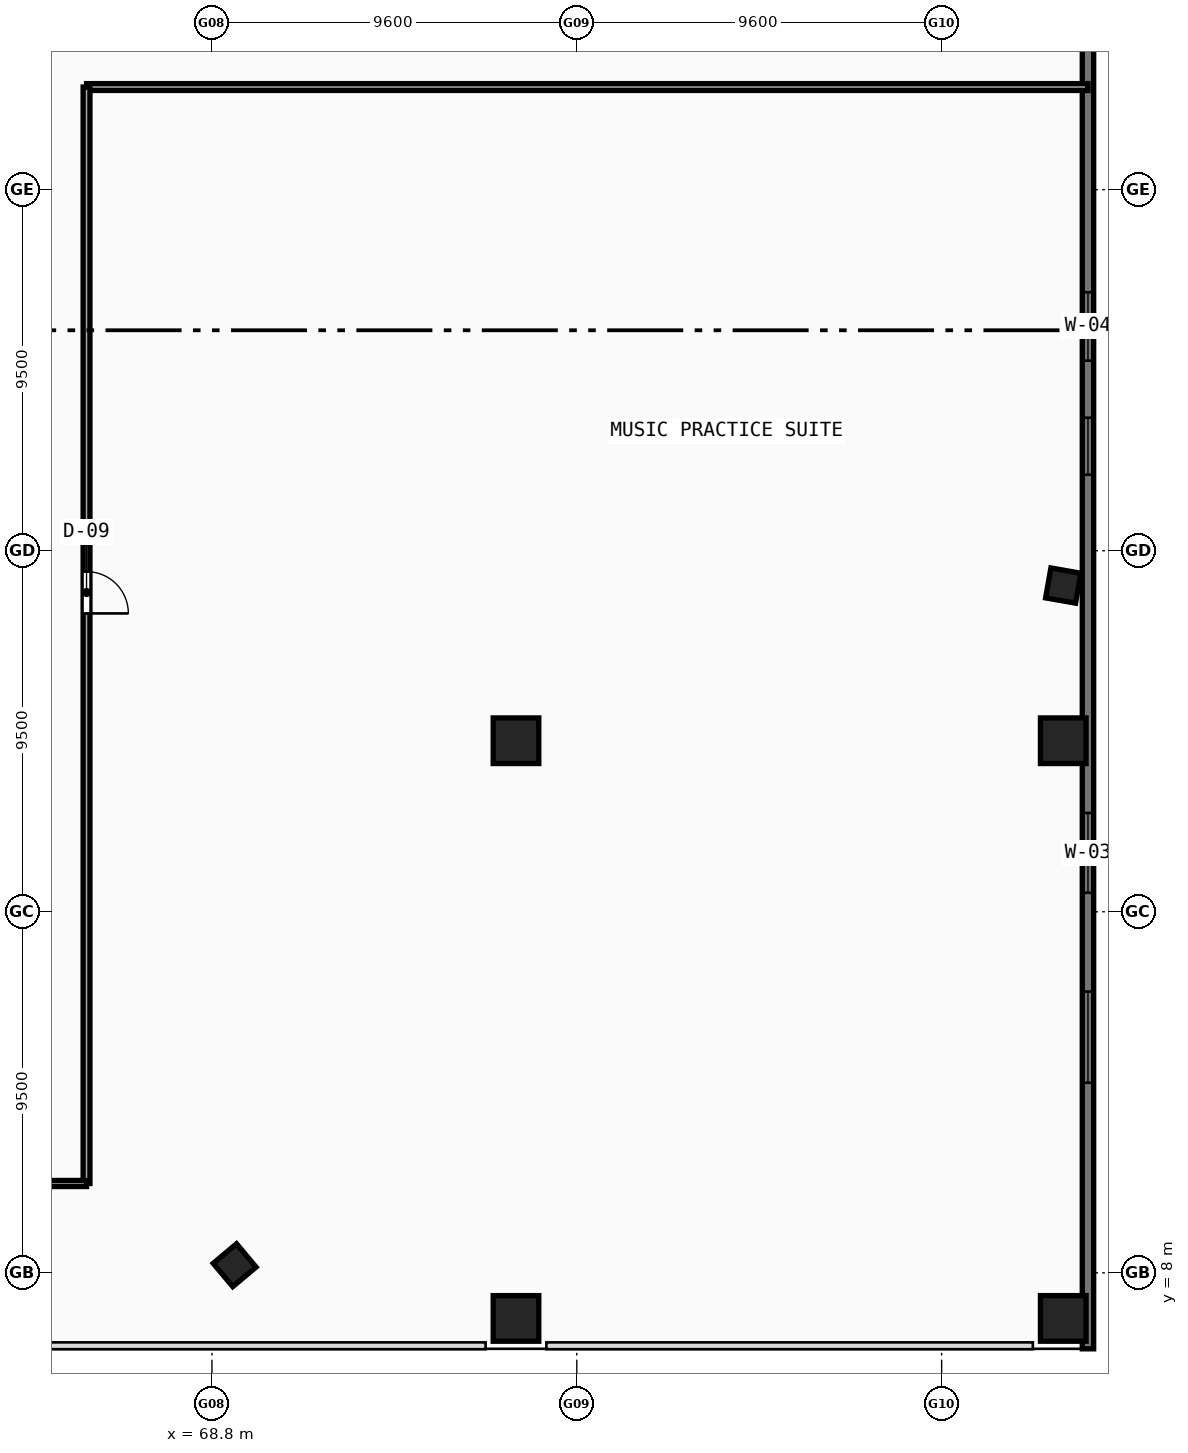
"""IFC4 building model, lengths in metres.
Left out: names, types, materials, properties, quantities, classifications, styles, units other than length and angle.
Written with IfcOpenShell. Run it as: python <this file> out.ifc"""

import sys

from ifc_helpers import new_model, si_unit, direction, frame, frame_2d, origin, origin_with_axes, origin_2d, place, context, subcontext, project, spatial, rectangle, hollow_rectangle, extrude, source, transform, mapped, element, fill, save


model = new_model("IFC4")
c1 = context("Model", 3, precision=1e-05, world=origin(), true_north=direction((0.0, 1.0)))
c2 = subcontext(c1, "Body", "Model", "MODEL_VIEW")
j1 = project(units=[si_unit("LENGTHUNIT", "METRE"), si_unit("PLANEANGLEUNIT", "RADIAN")], contexts=[c1])
p1 = place(None, origin())
s1 = spatial("IfcSite", under=j1, at=p1, CompositionType="ELEMENT")
p2 = place(p1, origin())
s2 = spatial("IfcBuilding", under=s1, at=p2, CompositionType="ELEMENT")
p3 = place(p2, frame((0.0, 0.0, 19.2)))
s3 = spatial("IfcBuildingStorey", under=s2, at=p3, CompositionType="ELEMENT", Elevation=19.2)
m1 = source(origin(), c2, "Body", "SweptSolid", [
    extrude(hollow_rectangle(XDim=1.2, YDim=1.2, WallThickness=0.05, at=origin_2d()), origin(), (0.0, 0.0, 1.0), 6.2),
])
for number, where, z_axis, x_axis in (
    (1, (76.8, 6.8, -0.28), (0.0, 0.0, 1.0), (1.0, 0.0, 0.0)),
    (2, (76.8, 22.0, -0.28), (0.0, 0.0, 1.0), (1.0, 0.0, 0.0)),
    (3, (91.2, 6.8, -0.28), (0.0, 0.0, 1.0), (1.0, 0.0, 0.0)),
    (4, (91.2, 22.0, -0.28), (0.0, 0.0, 1.0), (1.0, 0.0, 0.0)),
):
    element("IfcColumn", number, at=place(p3, frame(where, z_axis=z_axis, x_axis=x_axis)), inside=s3, PredefinedType="COLUMN", context=c2, shape_type="MappedRepresentation", body=[
        mapped(m1, transform((0.0, 0.0, 0.0), scale=1.0)),
    ])
m2 = source(origin(), c2, "Body", "SweptSolid", [
    extrude(hollow_rectangle(XDim=0.8, YDim=0.8, WallThickness=0.032, at=origin_2d()), origin(), (0.0, 0.0, 1.0), 6.2),
])
for number, where, z_axis, x_axis in (
    (5, (69.397, 8.2, -0.28), (0.0, 0.0, 1.0), (0.766, 0.643, 0.0)),
    (6, (91.199, 26.083, -0.28), (0.0, 0.0, 1.0), (0.174, 0.985, 0.0)),
):
    element("IfcColumn", number, at=place(p3, frame(where, z_axis=z_axis, x_axis=x_axis)), inside=s3, PredefinedType="COLUMN", context=c2, shape_type="MappedRepresentation", body=[
        mapped(m2, transform((0.0, 0.0, 0.0), scale=1.0)),
    ])
p4 = place(p3, frame((91.85, 6.0, 0.0), z_axis=(0.0, 0.0, 1.0), x_axis=(0.0, 1.0, 0.0)))
e7 = element("IfcWall", 7, at=p4, inside=s3, PredefinedType="STANDARD", context=c2, shape_type="SweptSolid", body=[
    extrude(rectangle(XDim=76.0, YDim=0.3, at=frame_2d((38.0, 0.0))), origin(), (0.0, 0.0, 1.0), 5.92),
])
p5 = place(p4, frame((7.0, 0.0, 0.9)))
e8 = element("IfcOpeningElement", 8, at=p5, cuts=e7, PredefinedType="OPENING", context=c2, shape_type="SweptSolid", body=[
    extrude(rectangle(XDim=2.4, YDim=1.8, at=frame_2d((1.2, 0.9))), frame((0.0, 0.16, 0.0), z_axis=(0.0, -1.0, 0.0), x_axis=(1.0, 0.0, 0.0)), (0.0, 0.0, 1.0), 0.32),
])
p6 = place(p4, frame((23.0, 0.0, 0.9)))
e9 = element("IfcOpeningElement", 9, at=p6, cuts=e7, PredefinedType="OPENING", context=c2, shape_type="SweptSolid", body=[
    extrude(rectangle(XDim=1.5, YDim=1.6, at=frame_2d((0.75, 0.8))), frame((0.0, 0.16, 0.0), z_axis=(0.0, -1.0, 0.0), x_axis=(1.0, 0.0, 0.0)), (0.0, 0.0, 1.0), 0.32),
])
p7 = place(p4, frame((43.0, 0.0, 0.9)))
e10 = element("IfcOpeningElement", 10, at=p7, cuts=e7, PredefinedType="OPENING", context=c2, shape_type="SweptSolid", body=[
    extrude(rectangle(XDim=2.4, YDim=1.8, at=frame_2d((1.2, 0.9))), frame((0.0, 0.16, 0.0), z_axis=(0.0, -1.0, 0.0), x_axis=(1.0, 0.0, 0.0)), (0.0, 0.0, 1.0), 0.32),
])
p8 = place(p4, frame((63.0, 0.0, 0.9)))
e11 = element("IfcOpeningElement", 11, at=p8, cuts=e7, PredefinedType="OPENING", context=c2, shape_type="SweptSolid", body=[
    extrude(rectangle(XDim=1.5, YDim=1.6, at=frame_2d((0.75, 0.8))), frame((0.0, 0.16, 0.0), z_axis=(0.0, -1.0, 0.0), x_axis=(1.0, 0.0, 0.0)), (0.0, 0.0, 1.0), 0.32),
])
p9 = place(p4, frame((12.0, 0.0, 0.95)))
e12 = element("IfcOpeningElement", 12, at=p9, cuts=e7, PredefinedType="OPENING", context=c2, shape_type="SweptSolid", body=[
    extrude(rectangle(XDim=2.1, YDim=1.75, at=frame_2d((1.05, 0.875))), frame((0.0, 0.16, 0.0), z_axis=(0.0, -1.0, 0.0), x_axis=(1.0, 0.0, 0.0)), (0.0, 0.0, 1.0), 0.32),
])
p10 = place(p4, frame((26.0, 0.0, 0.95)))
e13 = element("IfcOpeningElement", 13, at=p10, cuts=e7, PredefinedType="OPENING", context=c2, shape_type="SweptSolid", body=[
    extrude(rectangle(XDim=1.8, YDim=1.7, at=frame_2d((0.9, 0.85))), frame((0.0, 0.16, 0.0), z_axis=(0.0, -1.0, 0.0), x_axis=(1.0, 0.0, 0.0)), (0.0, 0.0, 1.0), 0.32),
])
p11 = place(p3, frame((65.5, 39.2, 0.0), z_axis=(0.0, 0.0, 1.0), x_axis=(1.0, 0.0, 0.0)))
e14 = element("IfcWall", 14, at=p11, inside=s3, PredefinedType="PARTITIONING", context=c2, shape_type="SweptSolid", body=[
    extrude(rectangle(XDim=26.35, YDim=0.18, at=frame_2d((13.175, 0.0))), origin(), (0.0, 0.0, 1.0), 2.42),
])
p12 = place(p3, frame((65.5, 10.35, 0.0), z_axis=(0.0, 0.0, 1.0), x_axis=(0.0, 1.0, 0.0)))
e15 = element("IfcWall", 15, at=p12, inside=s3, PredefinedType="PARTITIONING", context=c2, shape_type="SweptSolid", body=[
    extrude(rectangle(XDim=28.85, YDim=0.18, at=frame_2d((14.425, 0.0))), origin(), (0.0, 0.0, 1.0), 2.42),
])
p13 = place(p12, frame((15.0, 0.0, 0.0)))
e16 = element("IfcOpeningElement", 16, at=p13, cuts=e15, PredefinedType="OPENING", context=c2, shape_type="SweptSolid", body=[
    extrude(rectangle(XDim=1.1, YDim=2.15, at=frame_2d((0.55, 1.075))), frame((0.0, 0.1, 0.0), z_axis=(0.0, -1.0, 0.0), x_axis=(1.0, 0.0, 0.0)), (0.0, 0.0, 1.0), 0.2),
])
p14 = place(p3, frame((30.5, 10.35, 0.0), z_axis=(0.0, 0.0, 1.0), x_axis=(1.0, 0.0, 0.0)))
e17 = element("IfcWall", 17, at=p14, inside=s3, PredefinedType="PARTITIONING", context=c2, shape_type="SweptSolid", body=[
    extrude(rectangle(XDim=35.0, YDim=0.16, at=frame_2d((17.5, 0.0))), origin(), (0.0, 0.0, 1.0), 2.42),
])
m3 = source(origin(), c2, "Body", "SweptSolid", [
    extrude(rectangle(XDim=2.4, YDim=1.8, at=frame_2d((1.2, 0.9))), frame((0.0, 0.03, 0.0), z_axis=(0.0, -1.0, 0.0), x_axis=(1.0, 0.0, 0.0)), (0.0, 0.0, 1.0), 0.06),
])
p15 = place(p5, origin_with_axes())
e18 = element("IfcWindow", 18, at=p15, inside=s3, PartitioningType="SINGLE_PANEL", PredefinedType="WINDOW", context=c2, shape_type="MappedRepresentation", body=[
    mapped(m3, transform((0.0, 0.0, 0.0), scale=1.0)),
])
fill(e8, e18)
m4 = source(origin(), c2, "Body", "SweptSolid", [
    extrude(rectangle(XDim=1.5, YDim=1.6, at=frame_2d((0.75, 0.8))), frame((0.0, 0.03, 0.0), z_axis=(0.0, -1.0, 0.0), x_axis=(1.0, 0.0, 0.0)), (0.0, 0.0, 1.0), 0.06),
])
p16 = place(p6, origin_with_axes())
e19 = element("IfcWindow", 19, at=p16, inside=s3, PartitioningType="SINGLE_PANEL", PredefinedType="WINDOW", context=c2, shape_type="MappedRepresentation", body=[
    mapped(m4, transform((0.0, 0.0, 0.0), scale=1.0)),
])
fill(e9, e19)
m5 = source(origin(), c2, "Body", "SweptSolid", [
    extrude(rectangle(XDim=1.1, YDim=2.15, at=frame_2d((0.55, 1.075))), frame((0.0, 0.025, 0.0), z_axis=(0.0, -1.0, 0.0), x_axis=(1.0, 0.0, 0.0)), (0.0, 0.0, 1.0), 0.05),
])
p17 = place(p13, frame((1.1, 0.0, 0.0), z_axis=(0.0, 0.0, 1.0), x_axis=(-1.0, 0.0, 0.0)))
e20 = element("IfcDoor", 20, at=p17, inside=s3, OperationType="SINGLE_SWING_RIGHT", PredefinedType="DOOR", context=c2, shape_type="MappedRepresentation", body=[
    mapped(m5, transform((0.0, 0.0, 0.0), scale=1.0)),
])
fill(e16, e20)
m6 = source(origin(), c2, "Body", "SweptSolid", [
    extrude(rectangle(XDim=2.1, YDim=1.75, at=frame_2d((1.05, 0.875))), frame((0.0, 0.03, 0.0), z_axis=(0.0, -1.0, 0.0), x_axis=(1.0, 0.0, 0.0)), (0.0, 0.0, 1.0), 0.06),
])
p18 = place(p9, origin_with_axes())
e21 = element("IfcWindow", 21, at=p18, inside=s3, PartitioningType="SINGLE_PANEL", PredefinedType="WINDOW", context=c2, shape_type="MappedRepresentation", body=[
    mapped(m6, transform((0.0, 0.0, 0.0), scale=1.0)),
])
fill(e12, e21)
m7 = source(origin(), c2, "Body", "SweptSolid", [
    extrude(rectangle(XDim=1.8, YDim=1.7, at=frame_2d((0.9, 0.85))), frame((0.0, 0.03, 0.0), z_axis=(0.0, -1.0, 0.0), x_axis=(1.0, 0.0, 0.0)), (0.0, 0.0, 1.0), 0.06),
])
p19 = place(p10, origin_with_axes())
e22 = element("IfcWindow", 22, at=p19, inside=s3, PartitioningType="SINGLE_PANEL", PredefinedType="WINDOW", context=c2, shape_type="MappedRepresentation", body=[
    mapped(m7, transform((0.0, 0.0, 0.0), scale=1.0)),
])
fill(e13, e22)
save(model, sys.argv[1])
